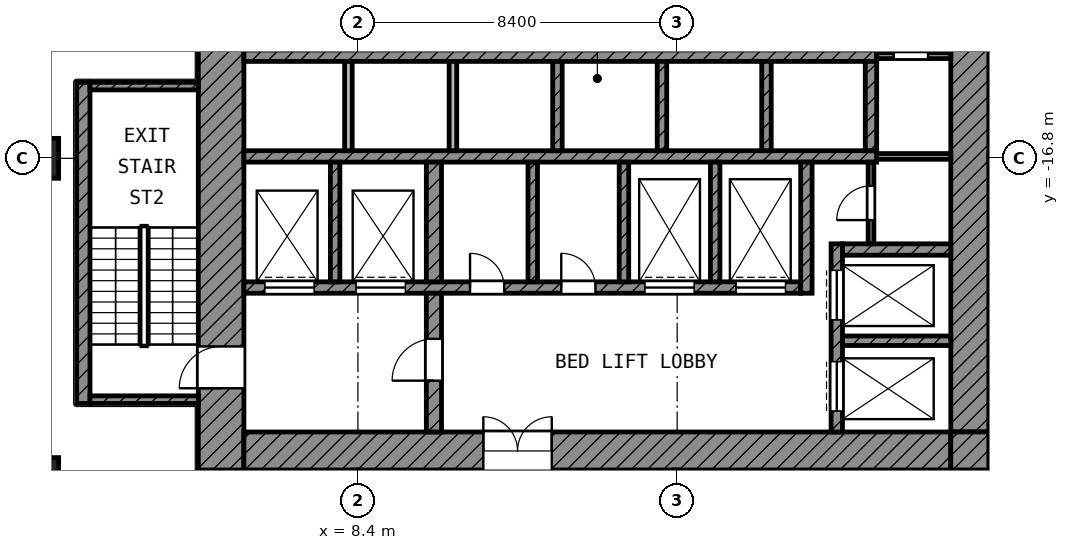
"""IFC4 building model, lengths in metres.
Left out: names, types, materials, properties, quantities, classifications, styles, units other than length and angle.
Written with IfcOpenShell. Run it as: python <this file> out.ifc"""

import sys

from ifc_helpers import new_model, si_unit, direction, frame, frame_2d, origin, origin_2d, place, context, subcontext, project, spatial, rectangle, extrude, element, fill, save


model = new_model("IFC4")
c1 = context("Model", 3, precision=1e-05, world=origin(), true_north=direction((0.0, 1.0)))
c2 = subcontext(c1, "Body", "Model", "MODEL_VIEW")
j1 = project(units=[si_unit("LENGTHUNIT", "METRE"), si_unit("PLANEANGLEUNIT", "RADIAN")], contexts=[c1])
p1 = place(None, origin())
s1 = spatial("IfcSite", under=j1, at=p1, CompositionType="ELEMENT")
p2 = place(p1, origin())
s2 = spatial("IfcBuilding", under=s1, at=p2, CompositionType="ELEMENT")
p3 = place(p2, frame((0.0, 0.0, 132.4)))
s3 = spatial("IfcBuildingStorey", under=s2, at=p3, CompositionType="ELEMENT", Elevation=132.4)
for number, where, z_axis, x_axis in (
    (1, (0.0, -16.8, 0.0), (0.0, 0.0, 1.0), (1.0, 0.0, 0.0)),
    (2, (0.0, -25.2, 0.0), (0.0, 0.0, 1.0), (1.0, 0.0, 0.0)),
):
    element("IfcColumn", number, at=place(p3, frame(where, z_axis=z_axis, x_axis=x_axis)), inside=s3, PredefinedType="COLUMN", context=c2, shape_type="SweptSolid", body=[
        extrude(rectangle(XDim=1.05, YDim=1.05, at=origin_2d()), origin(), (0.0, 0.0, 1.0), 4.2),
    ])
p4 = place(p3, frame((4.8, -25.0, 0.0), z_axis=(0.0, 0.0, 1.0), x_axis=(0.0, 1.0, 0.0)))
e3 = element("IfcWall", 3, at=p4, inside=s3, PredefinedType="SHEAR", context=c2, shape_type="SweptSolid", body=[
    extrude(rectangle(XDim=19.6, YDim=1.2, at=frame_2d((9.8, 0.0))), origin(), (0.0, 0.0, 1.0), 3.6),
])
p5 = place(p4, frame((11.45, 0.0, 0.0)))
e4 = element("IfcOpeningElement", 4, at=p5, cuts=e3, PredefinedType="OPENING", context=c2, shape_type="SweptSolid", body=[
    extrude(rectangle(XDim=1.1, YDim=2.1, at=frame_2d((0.55, 1.05))), frame((0.0, 0.61, 0.0), z_axis=(0.0, -1.0, 0.0), x_axis=(1.0, 0.0, 0.0)), (0.0, 0.0, 1.0), 1.22),
])
p6 = place(p4, frame((2.15, 0.0, 0.0)))
e5 = element("IfcOpeningElement", 5, at=p6, cuts=e3, PredefinedType="OPENING", context=c2, shape_type="SweptSolid", body=[
    extrude(rectangle(XDim=1.1, YDim=2.1, at=frame_2d((0.55, 1.05))), frame((0.0, 0.61, 0.0), z_axis=(0.0, -1.0, 0.0), x_axis=(1.0, 0.0, 0.0)), (0.0, 0.0, 1.0), 1.22),
])
p7 = place(p3, frame((24.5, -24.0, 0.0), z_axis=(0.0, 0.0, 1.0), x_axis=(0.0, 1.0, 0.0)))
e6 = element("IfcWall", 6, at=p7, inside=s3, PredefinedType="SHEAR", context=c2, shape_type="SweptSolid", body=[
    extrude(rectangle(XDim=18.6, YDim=1.0, at=frame_2d((9.3, 0.0))), origin(), (0.0, 0.0, 1.0), 3.6),
])
p8 = place(p7, frame((10.5, 0.0, 0.0)))
e7 = element("IfcOpeningElement", 7, at=p8, cuts=e6, PredefinedType="OPENING", context=c2, shape_type="SweptSolid", body=[
    extrude(rectangle(XDim=1.8, YDim=2.1, at=frame_2d((0.9, 1.05))), frame((0.0, 0.51, 0.0), z_axis=(0.0, -1.0, 0.0), x_axis=(1.0, 0.0, 0.0)), (0.0, 0.0, 1.0), 1.02),
])
p9 = place(p3, frame((5.4, -24.5, 0.0), z_axis=(0.0, 0.0, 1.0), x_axis=(1.0, 0.0, 0.0)))
e8 = element("IfcWall", 8, at=p9, inside=s3, PredefinedType="SHEAR", context=c2, shape_type="SweptSolid", body=[
    extrude(rectangle(XDim=18.6, YDim=1.0, at=frame_2d((9.3, 0.0))), origin(), (0.0, 0.0, 1.0), 3.6),
])
p10 = place(p9, frame((6.3, 0.0, 0.0)))
e9 = element("IfcOpeningElement", 9, at=p10, cuts=e8, PredefinedType="OPENING", context=c2, shape_type="SweptSolid", body=[
    extrude(rectangle(XDim=1.8, YDim=2.1, at=frame_2d((0.9, 1.05))), frame((0.0, 0.51, 0.0), z_axis=(0.0, -1.0, 0.0), x_axis=(1.0, 0.0, 0.0)), (0.0, 0.0, 1.0), 1.02),
])
p11 = place(p3, frame((24.5, -25.0, 0.0), z_axis=(0.0, 0.0, 1.0), x_axis=(0.0, 1.0, 0.0)))
e10 = element("IfcWall", 10, at=p11, inside=s3, PredefinedType="SHEAR", context=c2, shape_type="SweptSolid", body=[
    extrude(rectangle(XDim=1.0, YDim=1.0, at=frame_2d((0.5, 0.0))), origin(), (0.0, 0.0, 1.0), 3.6),
])
for number, where, z_axis, x_axis in (
    (11, (5.4, -14.1, 0.0), (0.0, 0.0, 1.0), (1.0, 0.0, 0.0)),
    (12, (5.4, -16.75, 0.0), (0.0, 0.0, 1.0), (1.0, 0.0, 0.0)),
):
    element("IfcWall", number, at=place(p3, frame(where, z_axis=z_axis, x_axis=x_axis)), inside=s3, PredefinedType="SHEAR", context=c2, shape_type="SweptSolid", body=[
        extrude(rectangle(XDim=16.65, YDim=0.3, at=frame_2d((8.325, 0.0))), origin(), (0.0, 0.0, 1.0), 3.6),
    ])
p12 = place(p3, frame((5.4, -20.2, 0.0), z_axis=(0.0, 0.0, 1.0), x_axis=(1.0, 0.0, 0.0)))
e13 = element("IfcWall", 13, at=p12, inside=s3, PredefinedType="SHEAR", context=c2, shape_type="SweptSolid", body=[
    extrude(rectangle(XDim=14.65, YDim=0.3, at=frame_2d((7.325, 0.0))), origin(), (0.0, 0.0, 1.0), 3.6),
])
p13 = place(p12, frame((10.55, 0.0, 0.0)))
e14 = element("IfcOpeningElement", 14, at=p13, cuts=e13, PredefinedType="OPENING", context=c2, shape_type="SweptSolid", body=[
    extrude(rectangle(XDim=1.3, YDim=2.1, at=frame_2d((0.65, 1.05))), frame((0.0, 0.16, 0.0), z_axis=(0.0, -1.0, 0.0), x_axis=(1.0, 0.0, 0.0)), (0.0, 0.0, 1.0), 0.32),
])
p14 = place(p12, frame((12.95, 0.0, 0.0)))
e15 = element("IfcOpeningElement", 15, at=p14, cuts=e13, PredefinedType="OPENING", context=c2, shape_type="SweptSolid", body=[
    extrude(rectangle(XDim=1.3, YDim=2.1, at=frame_2d((0.65, 1.05))), frame((0.0, 0.16, 0.0), z_axis=(0.0, -1.0, 0.0), x_axis=(1.0, 0.0, 0.0)), (0.0, 0.0, 1.0), 0.32),
])
p15 = place(p12, frame((0.55, 0.0, 0.0)))
e16 = element("IfcOpeningElement", 16, at=p15, cuts=e13, PredefinedType="OPENING", context=c2, shape_type="SweptSolid", body=[
    extrude(rectangle(XDim=1.3, YDim=2.1, at=frame_2d((0.65, 1.05))), frame((0.0, 0.16, 0.0), z_axis=(0.0, -1.0, 0.0), x_axis=(1.0, 0.0, 0.0)), (0.0, 0.0, 1.0), 0.32),
])
p16 = place(p12, frame((2.95, 0.0, 0.0)))
e17 = element("IfcOpeningElement", 17, at=p16, cuts=e13, PredefinedType="OPENING", context=c2, shape_type="SweptSolid", body=[
    extrude(rectangle(XDim=1.3, YDim=2.1, at=frame_2d((0.65, 1.05))), frame((0.0, 0.16, 0.0), z_axis=(0.0, -1.0, 0.0), x_axis=(1.0, 0.0, 0.0)), (0.0, 0.0, 1.0), 0.32),
])
p17 = place(p12, frame((5.95, 0.0, 0.0)))
e18 = element("IfcOpeningElement", 18, at=p17, cuts=e13, PredefinedType="OPENING", context=c2, shape_type="SweptSolid", body=[
    extrude(rectangle(XDim=0.9, YDim=2.1, at=frame_2d((0.45, 1.05))), frame((0.0, 0.16, 0.0), z_axis=(0.0, -1.0, 0.0), x_axis=(1.0, 0.0, 0.0)), (0.0, 0.0, 1.0), 0.32),
])
p18 = place(p12, frame((8.35, 0.0, 0.0)))
e19 = element("IfcOpeningElement", 19, at=p18, cuts=e13, PredefinedType="OPENING", context=c2, shape_type="SweptSolid", body=[
    extrude(rectangle(XDim=0.9, YDim=2.1, at=frame_2d((0.45, 1.05))), frame((0.0, 0.16, 0.0), z_axis=(0.0, -1.0, 0.0), x_axis=(1.0, 0.0, 0.0)), (0.0, 0.0, 1.0), 0.32),
])
p19 = place(p3, frame((10.4, -24.0, 0.0), z_axis=(0.0, 0.0, 1.0), x_axis=(0.0, 1.0, 0.0)))
e20 = element("IfcWall", 20, at=p19, inside=s3, PredefinedType="SHEAR", context=c2, shape_type="SweptSolid", body=[
    extrude(rectangle(XDim=3.65, YDim=0.4, at=frame_2d((1.825, 0.0))), origin(), (0.0, 0.0, 1.0), 3.6),
])
p20 = place(p19, frame((1.35, 0.0, 0.0)))
e21 = element("IfcOpeningElement", 21, at=p20, cuts=e20, PredefinedType="OPENING", context=c2, shape_type="SweptSolid", body=[
    extrude(rectangle(XDim=1.1, YDim=2.1, at=frame_2d((0.55, 1.05))), frame((0.0, 0.21, 0.0), z_axis=(0.0, -1.0, 0.0), x_axis=(1.0, 0.0, 0.0)), (0.0, 0.0, 1.0), 0.42),
])
p21 = place(p3, frame((10.4, -20.05, 0.0), z_axis=(0.0, 0.0, 1.0), x_axis=(0.0, 1.0, 0.0)))
e22 = element("IfcWall", 22, at=p21, inside=s3, PredefinedType="SHEAR", context=c2, shape_type="SweptSolid", body=[
    extrude(rectangle(XDim=3.15, YDim=0.4, at=frame_2d((1.575, 0.0))), origin(), (0.0, 0.0, 1.0), 3.6),
])
p22 = place(p3, frame((20.2, -20.35, 0.0), z_axis=(0.0, 0.0, 1.0), x_axis=(0.0, 1.0, 0.0)))
e23 = element("IfcWall", 23, at=p22, inside=s3, PredefinedType="SHEAR", context=c2, shape_type="SweptSolid", body=[
    extrude(rectangle(XDim=3.45, YDim=0.3, at=frame_2d((1.725, 0.0))), origin(), (0.0, 0.0, 1.0), 3.6),
])
p23 = place(p3, frame((21.9, -16.6, 0.0), z_axis=(0.0, 0.0, 1.0), x_axis=(0.0, 1.0, 0.0)))
e24 = element("IfcWall", 24, at=p23, inside=s3, PredefinedType="SHEAR", context=c2, shape_type="SweptSolid", body=[
    extrude(rectangle(XDim=2.35, YDim=0.3, at=frame_2d((1.175, 0.0))), origin(), (0.0, 0.0, 1.0), 3.6),
])
p24 = place(p3, frame((21.15, -19.2, 0.0), z_axis=(0.0, 0.0, 1.0), x_axis=(1.0, 0.0, 0.0)))
e25 = element("IfcWall", 25, at=p24, inside=s3, PredefinedType="SHEAR", context=c2, shape_type="SweptSolid", body=[
    extrude(rectangle(XDim=2.85, YDim=0.3, at=frame_2d((1.425, 0.0))), origin(), (0.0, 0.0, 1.0), 3.6),
])
p25 = place(p3, frame((21.0, -24.0, 0.0), z_axis=(0.0, 0.0, 1.0), x_axis=(0.0, 1.0, 0.0)))
e26 = element("IfcWall", 26, at=p25, inside=s3, PredefinedType="SHEAR", context=c2, shape_type="SweptSolid", body=[
    extrude(rectangle(XDim=4.95, YDim=0.3, at=frame_2d((2.475, 0.0))), origin(), (0.0, 0.0, 1.0), 3.6),
])
p26 = place(p25, frame((2.95, 0.0, 0.0)))
e27 = element("IfcOpeningElement", 27, at=p26, cuts=e26, PredefinedType="OPENING", context=c2, shape_type="SweptSolid", body=[
    extrude(rectangle(XDim=1.3, YDim=2.1, at=frame_2d((0.65, 1.05))), frame((0.0, 0.16, 0.0), z_axis=(0.0, -1.0, 0.0), x_axis=(1.0, 0.0, 0.0)), (0.0, 0.0, 1.0), 0.32),
])
p27 = place(p25, frame((0.55, 0.0, 0.0)))
e28 = element("IfcOpeningElement", 28, at=p27, cuts=e26, PredefinedType="OPENING", context=c2, shape_type="SweptSolid", body=[
    extrude(rectangle(XDim=1.3, YDim=2.1, at=frame_2d((0.65, 1.05))), frame((0.0, 0.16, 0.0), z_axis=(0.0, -1.0, 0.0), x_axis=(1.0, 0.0, 0.0)), (0.0, 0.0, 1.0), 0.32),
])
p28 = place(p3, frame((21.15, -21.6, 0.0), z_axis=(0.0, 0.0, 1.0), x_axis=(1.0, 0.0, 0.0)))
e29 = element("IfcWall", 29, at=p28, inside=s3, PredefinedType="SHEAR", context=c2, shape_type="SweptSolid", body=[
    extrude(rectangle(XDim=2.85, YDim=0.25, at=frame_2d((1.425, 0.0))), origin(), (0.0, 0.0, 1.0), 3.6),
])
for number, where, z_axis, x_axis in (
    (30, (7.8, -20.05, 0.0), (0.0, 0.0, 1.0), (0.0, 1.0, 0.0)),
    (31, (13.0, -20.05, 0.0), (0.0, 0.0, 1.0), (0.0, 1.0, 0.0)),
    (32, (15.4, -20.05, 0.0), (0.0, 0.0, 1.0), (0.0, 1.0, 0.0)),
    (33, (17.8, -20.05, 0.0), (0.0, 0.0, 1.0), (0.0, 1.0, 0.0)),
):
    element("IfcWall", number, at=place(p3, frame(where, z_axis=z_axis, x_axis=x_axis)), inside=s3, PredefinedType="SHEAR", context=c2, shape_type="SweptSolid", body=[
        extrude(rectangle(XDim=3.15, YDim=0.25, at=frame_2d((1.575, 0.0))), origin(), (0.0, 0.0, 1.0), 3.6),
    ])
for number, where, z_axis, x_axis in (
    (34, (8.15, -16.6, 0.0), (0.0, 0.0, 1.0), (0.0, 1.0, 0.0)),
    (35, (10.9, -16.6, 0.0), (0.0, 0.0, 1.0), (0.0, 1.0, 0.0)),
):
    element("IfcWall", number, at=place(p3, frame(where, z_axis=z_axis, x_axis=x_axis)), inside=s3, PredefinedType="PARTITIONING", context=c2, shape_type="SweptSolid", body=[
        extrude(rectangle(XDim=2.35, YDim=0.2, at=frame_2d((1.175, 0.0))), origin(), (0.0, 0.0, 1.0), 3.6),
    ])
for number, where, z_axis, x_axis in (
    (36, (13.65, -16.6, 0.0), (0.0, 0.0, 1.0), (0.0, 1.0, 0.0)),
    (37, (16.4, -16.6, 0.0), (0.0, 0.0, 1.0), (0.0, 1.0, 0.0)),
    (38, (19.15, -16.6, 0.0), (0.0, 0.0, 1.0), (0.0, 1.0, 0.0)),
):
    element("IfcWall", number, at=place(p3, frame(where, z_axis=z_axis, x_axis=x_axis)), inside=s3, PredefinedType="SHEAR", context=c2, shape_type="SweptSolid", body=[
        extrude(rectangle(XDim=2.35, YDim=0.25, at=frame_2d((1.175, 0.0))), origin(), (0.0, 0.0, 1.0), 3.6),
    ])
p29 = place(p3, frame((21.9, -19.05, 0.0), z_axis=(0.0, 0.0, 1.0), x_axis=(0.0, 1.0, 0.0)))
e39 = element("IfcWall", 39, at=p29, inside=s3, PredefinedType="PARTITIONING", context=c2, shape_type="SweptSolid", body=[
    extrude(rectangle(XDim=2.15, YDim=0.15, at=frame_2d((1.075, 0.0))), origin(), (0.0, 0.0, 1.0), 3.6),
])
p30 = place(p29, frame((0.625, 0.0, 0.0)))
e40 = element("IfcOpeningElement", 40, at=p30, cuts=e39, PredefinedType="OPENING", context=c2, shape_type="SweptSolid", body=[
    extrude(rectangle(XDim=0.9, YDim=2.1, at=frame_2d((0.45, 1.05))), frame((0.0, 0.085, 0.0), z_axis=(0.0, -1.0, 0.0), x_axis=(1.0, 0.0, 0.0)), (0.0, 0.0, 1.0), 0.17),
])
p31 = place(p3, frame((22.05, -16.75, 0.0), z_axis=(0.0, 0.0, 1.0), x_axis=(1.0, 0.0, 0.0)))
e41 = element("IfcWall", 41, at=p31, inside=s3, PredefinedType="PARTITIONING", context=c2, shape_type="SweptSolid", body=[
    extrude(rectangle(XDim=1.95, YDim=0.15, at=frame_2d((0.975, 0.0))), origin(), (0.0, 0.0, 1.0), 3.6),
])
p32 = place(p3, frame((22.05, -14.1, 0.0), z_axis=(0.0, 0.0, 1.0), x_axis=(1.0, 0.0, 0.0)))
e42 = element("IfcWall", 42, at=p32, inside=s3, PredefinedType="PARTITIONING", context=c2, shape_type="SweptSolid", body=[
    extrude(rectangle(XDim=1.95, YDim=0.15, at=frame_2d((0.975, 0.0))), origin(), (0.0, 0.0, 1.0), 3.6),
])
p33 = place(p32, frame((0.45, 0.0, 0.0)))
e43 = element("IfcOpeningElement", 43, at=p33, cuts=e42, PredefinedType="OPENING", context=c2, shape_type="SweptSolid", body=[
    extrude(rectangle(XDim=0.9, YDim=2.1, at=frame_2d((0.45, 1.05))), frame((0.0, 0.085, 0.0), z_axis=(0.0, -1.0, 0.0), x_axis=(1.0, 0.0, 0.0)), (0.0, 0.0, 1.0), 0.17),
])
p34 = place(p3, frame((1.175, -23.25, 0.0), z_axis=(0.0, 0.0, 1.0), x_axis=(0.0, 1.0, 0.0)))
e44 = element("IfcWall", 44, at=p34, inside=s3, PredefinedType="SHEAR", context=c2, shape_type="SweptSolid", body=[
    extrude(rectangle(XDim=8.45, YDim=0.35, at=frame_2d((4.225, 0.0))), origin(), (0.0, 0.0, 1.0), 3.6),
])
for number, where, z_axis, x_axis in (
    (45, (1.35, -14.9, 0.0), (0.0, 0.0, 1.0), (1.0, 0.0, 0.0)),
    (46, (1.35, -23.15, 0.0), (0.0, 0.0, 1.0), (1.0, 0.0, 0.0)),
):
    element("IfcWall", number, at=place(p3, frame(where, z_axis=z_axis, x_axis=x_axis)), inside=s3, PredefinedType="SHEAR", context=c2, shape_type="SweptSolid", body=[
        extrude(rectangle(XDim=2.85, YDim=0.2, at=frame_2d((1.425, 0.0))), origin(), (0.0, 0.0, 1.0), 3.6),
    ])
p35 = place(p3, frame((8.4, -31.782, 0.0), z_axis=(0.0, 0.0, 1.0), x_axis=(0.0, 1.0, 0.0)))
e47 = element("IfcWall", 47, at=p35, inside=s3, PredefinedType="PARTITIONING", context=c2, shape_type="SweptSolid", body=[
    extrude(rectangle(XDim=6.782, YDim=0.15, at=frame_2d((3.391, 0.0))), origin(), (0.0, 0.0, 1.0), 3.6),
])
p36 = place(p26, origin())
e48 = element("IfcDoor", 48, at=p36, inside=s3, OperationType="DOUBLE_DOOR_SLIDING", PredefinedType="DOOR", context=c2, shape_type="SweptSolid", body=[
    extrude(rectangle(XDim=1.3, YDim=2.1, at=frame_2d((0.65, 1.05))), frame((0.0, 0.025, 0.0), z_axis=(0.0, -1.0, 0.0), x_axis=(1.0, 0.0, 0.0)), (0.0, 0.0, 1.0), 0.05),
])
fill(e27, e48)
p37 = place(p27, origin())
e49 = element("IfcDoor", 49, at=p37, inside=s3, OperationType="DOUBLE_DOOR_SLIDING", PredefinedType="DOOR", context=c2, shape_type="SweptSolid", body=[
    extrude(rectangle(XDim=1.3, YDim=2.1, at=frame_2d((0.65, 1.05))), frame((0.0, 0.025, 0.0), z_axis=(0.0, -1.0, 0.0), x_axis=(1.0, 0.0, 0.0)), (0.0, 0.0, 1.0), 0.05),
])
fill(e28, e49)
p38 = place(p13, origin())
e50 = element("IfcDoor", 50, at=p38, inside=s3, OperationType="DOUBLE_DOOR_SLIDING", PredefinedType="DOOR", context=c2, shape_type="SweptSolid", body=[
    extrude(rectangle(XDim=1.3, YDim=2.1, at=frame_2d((0.65, 1.05))), frame((0.0, 0.025, 0.0), z_axis=(0.0, -1.0, 0.0), x_axis=(1.0, 0.0, 0.0)), (0.0, 0.0, 1.0), 0.05),
])
fill(e14, e50)
p39 = place(p14, origin())
e51 = element("IfcDoor", 51, at=p39, inside=s3, OperationType="DOUBLE_DOOR_SLIDING", PredefinedType="DOOR", context=c2, shape_type="SweptSolid", body=[
    extrude(rectangle(XDim=1.3, YDim=2.1, at=frame_2d((0.65, 1.05))), frame((0.0, 0.025, 0.0), z_axis=(0.0, -1.0, 0.0), x_axis=(1.0, 0.0, 0.0)), (0.0, 0.0, 1.0), 0.05),
])
fill(e15, e51)
p40 = place(p15, origin())
e52 = element("IfcDoor", 52, at=p40, inside=s3, OperationType="DOUBLE_DOOR_SLIDING", PredefinedType="DOOR", context=c2, shape_type="SweptSolid", body=[
    extrude(rectangle(XDim=1.3, YDim=2.1, at=frame_2d((0.65, 1.05))), frame((0.0, 0.025, 0.0), z_axis=(0.0, -1.0, 0.0), x_axis=(1.0, 0.0, 0.0)), (0.0, 0.0, 1.0), 0.05),
])
fill(e16, e52)
p41 = place(p16, origin())
e53 = element("IfcDoor", 53, at=p41, inside=s3, OperationType="DOUBLE_DOOR_SLIDING", PredefinedType="DOOR", context=c2, shape_type="SweptSolid", body=[
    extrude(rectangle(XDim=1.3, YDim=2.1, at=frame_2d((0.65, 1.05))), frame((0.0, 0.025, 0.0), z_axis=(0.0, -1.0, 0.0), x_axis=(1.0, 0.0, 0.0)), (0.0, 0.0, 1.0), 0.05),
])
fill(e17, e53)
p42 = place(p6, origin())
e54 = element("IfcDoor", 54, at=p42, inside=s3, OperationType="SINGLE_SWING_LEFT", PredefinedType="DOOR", context=c2, shape_type="SweptSolid", body=[
    extrude(rectangle(XDim=1.1, YDim=2.1, at=frame_2d((0.55, 1.05))), frame((0.0, 0.025, 0.0), z_axis=(0.0, -1.0, 0.0), x_axis=(1.0, 0.0, 0.0)), (0.0, 0.0, 1.0), 0.05),
])
fill(e5, e54)
p43 = place(p20, origin())
e55 = element("IfcDoor", 55, at=p43, inside=s3, OperationType="SINGLE_SWING_LEFT", PredefinedType="DOOR", context=c2, shape_type="SweptSolid", body=[
    extrude(rectangle(XDim=1.1, YDim=2.1, at=frame_2d((0.55, 1.05))), frame((0.0, 0.025, 0.0), z_axis=(0.0, -1.0, 0.0), x_axis=(1.0, 0.0, 0.0)), (0.0, 0.0, 1.0), 0.05),
])
fill(e21, e55)
p44 = place(p10, origin())
e56 = element("IfcDoor", 56, at=p44, inside=s3, OperationType="DOUBLE_DOOR_SINGLE_SWING", PredefinedType="DOOR", context=c2, shape_type="SweptSolid", body=[
    extrude(rectangle(XDim=1.8, YDim=2.1, at=frame_2d((0.9, 1.05))), frame((0.0, 0.025, 0.0), z_axis=(0.0, -1.0, 0.0), x_axis=(1.0, 0.0, 0.0)), (0.0, 0.0, 1.0), 0.05),
])
fill(e9, e56)
p45 = place(p33, origin())
e57 = element("IfcDoor", 57, at=p45, inside=s3, OperationType="SINGLE_SWING_LEFT", PredefinedType="DOOR", context=c2, shape_type="SweptSolid", body=[
    extrude(rectangle(XDim=0.9, YDim=2.1, at=frame_2d((0.45, 1.05))), frame((0.0, 0.025, 0.0), z_axis=(0.0, -1.0, 0.0), x_axis=(1.0, 0.0, 0.0)), (0.0, 0.0, 1.0), 0.05),
])
fill(e43, e57)
p46 = place(p30, origin())
e58 = element("IfcDoor", 58, at=p46, inside=s3, OperationType="SINGLE_SWING_LEFT", PredefinedType="DOOR", context=c2, shape_type="SweptSolid", body=[
    extrude(rectangle(XDim=0.9, YDim=2.1, at=frame_2d((0.45, 1.05))), frame((0.0, 0.025, 0.0), z_axis=(0.0, -1.0, 0.0), x_axis=(1.0, 0.0, 0.0)), (0.0, 0.0, 1.0), 0.05),
])
fill(e40, e58)
p47 = place(p17, origin())
e59 = element("IfcDoor", 59, at=p47, inside=s3, OperationType="SINGLE_SWING_LEFT", PredefinedType="DOOR", context=c2, shape_type="SweptSolid", body=[
    extrude(rectangle(XDim=0.9, YDim=2.1, at=frame_2d((0.45, 1.05))), frame((0.0, 0.025, 0.0), z_axis=(0.0, -1.0, 0.0), x_axis=(1.0, 0.0, 0.0)), (0.0, 0.0, 1.0), 0.05),
])
fill(e18, e59)
p48 = place(p18, origin())
e60 = element("IfcDoor", 60, at=p48, inside=s3, OperationType="SINGLE_SWING_LEFT", PredefinedType="DOOR", context=c2, shape_type="SweptSolid", body=[
    extrude(rectangle(XDim=0.9, YDim=2.1, at=frame_2d((0.45, 1.05))), frame((0.0, 0.025, 0.0), z_axis=(0.0, -1.0, 0.0), x_axis=(1.0, 0.0, 0.0)), (0.0, 0.0, 1.0), 0.05),
])
fill(e19, e60)
save(model, sys.argv[1])
